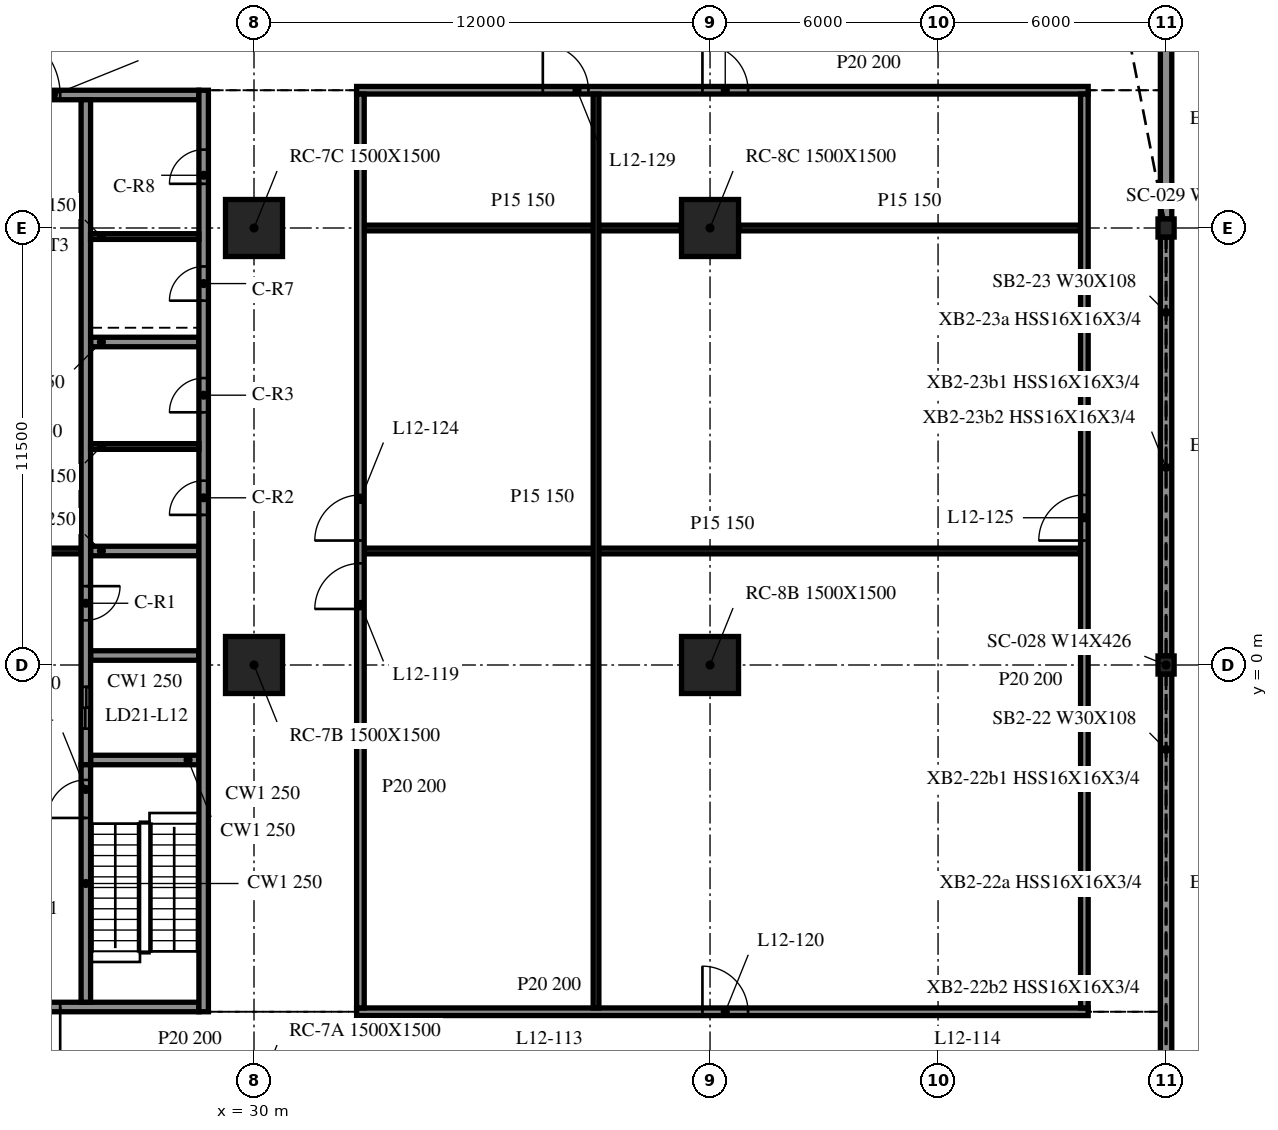
"""IFC4 building model, lengths in metres.
Left out: names, types, materials, properties, quantities, classifications, styles, units other than length and angle.
Written with IfcOpenShell. Run it as: python <this file> out.ifc"""

import sys

from ifc_helpers import new_model, si_unit, direction, frame, frame_2d, origin, origin_2d, place, context, subcontext, project, spatial, rectangle, i_section, extrude, element, fill, save


model = new_model("IFC4")
c1 = context("Model", 3, precision=1e-05, world=origin(), true_north=direction((0.0, 1.0)))
c2 = subcontext(c1, "Body", "Model", "MODEL_VIEW")
j1 = project(units=[si_unit("LENGTHUNIT", "METRE"), si_unit("PLANEANGLEUNIT", "RADIAN")], contexts=[c1])
p1 = place(None, origin())
s1 = spatial("IfcSite", under=j1, at=p1, CompositionType="ELEMENT")
p2 = place(p1, origin())
s2 = spatial("IfcBuilding", under=s1, at=p2, CompositionType="ELEMENT")
p3 = place(p2, frame((0.0, 0.0, 54.6)))
s3 = spatial("IfcBuildingStorey", under=s2, at=p3, CompositionType="ELEMENT", Elevation=54.6)
for number, where, z_axis, x_axis in (
    (1, (30.0, 0.0, -0.34), (0.0, 0.0, 1.0), (1.0, 0.0, 0.0)),
    (2, (30.0, 11.5, -0.34), (0.0, 0.0, 1.0), (1.0, 0.0, 0.0)),
    (3, (42.0, 0.0, -0.34), (0.0, 0.0, 1.0), (1.0, 0.0, 0.0)),
    (4, (42.0, 11.5, -0.34), (0.0, 0.0, 1.0), (1.0, 0.0, 0.0)),
):
    element("IfcColumn", number, at=place(p3, frame(where, z_axis=z_axis, x_axis=x_axis)), inside=s3, PredefinedType="COLUMN", context=c2, shape_type="SweptSolid", body=[
        extrude(rectangle(XDim=1.5, YDim=1.5, at=origin_2d()), origin(), (0.0, 0.0, 1.0), 4.3),
    ])
for number, where, z_axis, x_axis in (
    (5, (54.0, 0.0, -0.34), (0.0, 0.0, 1.0), (1.0, 0.0, 0.0)),
    (6, (54.0, 11.5, -0.34), (0.0, 0.0, 1.0), (1.0, 0.0, 0.0)),
):
    element("IfcColumn", number, at=place(p3, frame(where, z_axis=z_axis, x_axis=x_axis)), inside=s3, PredefinedType="COLUMN", context=c2, shape_type="SweptSolid", body=[
        extrude(i_section(OverallWidth=0.424, OverallDepth=0.475, WebThickness=0.048, FlangeThickness=0.077, at=origin_2d()), origin(), (0.0, 0.0, 1.0), 4.3),
    ])
for number, where, z_axis, x_axis in (
    (7, (54.0, -11.262, 0.0), (0.0, 0.0, 1.0), (0.0, 1.0, 0.0)),
    (8, (54.0, 0.238, 0.0), (0.0, 0.0, 1.0), (0.0, 1.0, 0.0)),
):
    element("IfcWall", number, at=place(p3, frame(where, z_axis=z_axis, x_axis=x_axis)), inside=s3, PredefinedType="NOTDEFINED", context=c2, shape_type="SweptSolid", body=[
        extrude(rectangle(XDim=11.024, YDim=0.3, at=frame_2d((5.512, 0.0))), origin(), (0.0, 0.0, 1.0), 3.203),
    ])
p4 = place(p3, frame((54.0, 11.738, 0.0), z_axis=(0.0, 0.0, 1.0), x_axis=(0.0, 1.0, 0.0)))
e9 = element("IfcWall", 9, at=p4, inside=s3, PredefinedType="NOTDEFINED", context=c2, shape_type="SweptSolid", body=[
    extrude(rectangle(XDim=5.262, YDim=0.3, at=frame_2d((2.631, 0.0))), origin(), (0.0, 0.0, 1.0), 3.203),
])
p5 = place(p3, frame((28.675, -9.125, 0.0), z_axis=(0.0, 0.0, 1.0), x_axis=(0.0, 1.0, 0.0)))
e10 = element("IfcWall", 10, at=p5, inside=s3, PredefinedType="SOLIDWALL", context=c2, shape_type="SweptSolid", body=[
    extrude(rectangle(XDim=24.25, YDim=0.25, at=frame_2d((12.125, 0.0))), origin(), (0.0, 0.0, 1.0), 3.96),
])
p6 = place(p5, frame((13.075, 0.0, 0.0)))
e11 = element("IfcOpeningElement", 11, at=p6, cuts=e10, PredefinedType="OPENING", context=c2, shape_type="SweptSolid", body=[
    extrude(rectangle(XDim=0.9, YDim=2.1, at=frame_2d((0.45, 1.05))), frame((0.0, 0.135, 0.0), z_axis=(0.0, -1.0, 0.0), x_axis=(1.0, 0.0, 0.0)), (0.0, 0.0, 1.0), 0.27),
])
p7 = place(p5, frame((15.775, 0.0, 0.0)))
e12 = element("IfcOpeningElement", 12, at=p7, cuts=e10, PredefinedType="OPENING", context=c2, shape_type="SweptSolid", body=[
    extrude(rectangle(XDim=0.9, YDim=2.1, at=frame_2d((0.45, 1.05))), frame((0.0, 0.135, 0.0), z_axis=(0.0, -1.0, 0.0), x_axis=(1.0, 0.0, 0.0)), (0.0, 0.0, 1.0), 0.27),
])
p8 = place(p5, frame((18.712, 0.0, 0.0)))
e13 = element("IfcOpeningElement", 13, at=p8, cuts=e10, PredefinedType="OPENING", context=c2, shape_type="SweptSolid", body=[
    extrude(rectangle(XDim=0.9, YDim=2.1, at=frame_2d((0.45, 1.05))), frame((0.0, 0.135, 0.0), z_axis=(0.0, -1.0, 0.0), x_axis=(1.0, 0.0, 0.0)), (0.0, 0.0, 1.0), 0.27),
])
p9 = place(p5, frame((21.788, 0.0, 0.0)))
e14 = element("IfcOpeningElement", 14, at=p9, cuts=e10, PredefinedType="OPENING", context=c2, shape_type="SweptSolid", body=[
    extrude(rectangle(XDim=0.9, YDim=2.1, at=frame_2d((0.45, 1.05))), frame((0.0, 0.135, 0.0), z_axis=(0.0, -1.0, 0.0), x_axis=(1.0, 0.0, 0.0)), (0.0, 0.0, 1.0), 0.27),
])
p10 = place(p3, frame((28.55, -9.0, 0.0), z_axis=(0.0, 0.0, 1.0), x_axis=(-1.0, 0.0, 0.0)))
e15 = element("IfcWall", 15, at=p10, inside=s3, PredefinedType="SOLIDWALL", context=c2, shape_type="SweptSolid", body=[
    extrude(rectangle(XDim=9.1, YDim=0.25, at=frame_2d((4.55, 0.0))), origin(), (0.0, 0.0, 1.0), 3.96),
])
p11 = place(p10, frame((3.65, 0.0, 0.0)))
e16 = element("IfcOpeningElement", 16, at=p11, cuts=e15, PredefinedType="OPENING", context=c2, shape_type="SweptSolid", body=[
    extrude(rectangle(XDim=1.8, YDim=2.1, at=frame_2d((0.9, 1.05))), frame((0.0, 0.135, 0.0), z_axis=(0.0, -1.0, 0.0), x_axis=(1.0, 0.0, 0.0)), (0.0, 0.0, 1.0), 0.27),
])
p12 = place(p3, frame((19.45, 15.0, 0.0), z_axis=(0.0, 0.0, 1.0), x_axis=(1.0, 0.0, 0.0)))
e17 = element("IfcWall", 17, at=p12, inside=s3, PredefinedType="SOLIDWALL", context=c2, shape_type="SweptSolid", body=[
    extrude(rectangle(XDim=9.1, YDim=0.25, at=frame_2d((4.55, 0.0))), origin(), (0.0, 0.0, 1.0), 3.96),
])
p13 = place(p12, frame((3.65, 0.0, 0.0)))
e18 = element("IfcOpeningElement", 18, at=p13, cuts=e17, PredefinedType="OPENING", context=c2, shape_type="SweptSolid", body=[
    extrude(rectangle(XDim=1.8, YDim=2.1, at=frame_2d((0.9, 1.05))), frame((0.0, 0.135, 0.0), z_axis=(0.0, -1.0, 0.0), x_axis=(1.0, 0.0, 0.0)), (0.0, 0.0, 1.0), 0.27),
])
p14 = place(p3, frame((25.575, -8.875, 0.0), z_axis=(0.0, 0.0, 1.0), x_axis=(0.0, 1.0, 0.0)))
e19 = element("IfcWall", 19, at=p14, inside=s3, PredefinedType="SOLIDWALL", context=c2, shape_type="SweptSolid", body=[
    extrude(rectangle(XDim=6.25, YDim=0.25, at=frame_2d((3.125, 0.0))), origin(), (0.0, 0.0, 1.0), 3.96),
])
p15 = place(p14, frame((4.85, 0.0, 0.0)))
e20 = element("IfcOpeningElement", 20, at=p15, cuts=e19, PredefinedType="OPENING", context=c2, shape_type="SweptSolid", body=[
    extrude(rectangle(XDim=1.0, YDim=2.1, at=frame_2d((0.5, 1.05))), frame((0.0, 0.135, 0.0), z_axis=(0.0, -1.0, 0.0), x_axis=(1.0, 0.0, 0.0)), (0.0, 0.0, 1.0), 0.27),
])
p16 = place(p3, frame((25.575, 14.875, 0.0), z_axis=(0.0, 0.0, 1.0), x_axis=(0.0, -1.0, 0.0)))
e21 = element("IfcWall", 21, at=p16, inside=s3, PredefinedType="SOLIDWALL", context=c2, shape_type="SweptSolid", body=[
    extrude(rectangle(XDim=17.5, YDim=0.25, at=frame_2d((8.75, 0.0))), origin(), (0.0, 0.0, 1.0), 3.96),
])
p17 = place(p16, frame((15.45, 0.0, 0.0)))
e22 = element("IfcOpeningElement", 22, at=p17, cuts=e21, PredefinedType="OPENING", context=c2, shape_type="SweptSolid", body=[
    extrude(rectangle(XDim=1.1, YDim=2.1, at=frame_2d((0.55, 1.05))), frame((0.0, 0.135, 0.0), z_axis=(0.0, -1.0, 0.0), x_axis=(1.0, 0.0, 0.0)), (0.0, 0.0, 1.0), 0.27),
])
p18 = place(p16, frame((12.8, 0.0, 0.0)))
e23 = element("IfcOpeningElement", 23, at=p18, cuts=e21, PredefinedType="OPENING", context=c2, shape_type="SweptSolid", body=[
    extrude(rectangle(XDim=0.9, YDim=2.1, at=frame_2d((0.45, 1.05))), frame((0.0, 0.135, 0.0), z_axis=(0.0, -1.0, 0.0), x_axis=(1.0, 0.0, 0.0)), (0.0, 0.0, 1.0), 0.27),
])
for number, where, z_axis, x_axis in (
    (24, (25.7, -2.5, 0.0), (0.0, 0.0, 1.0), (1.0, 0.0, 0.0)),
    (25, (25.7, 0.25, 0.0), (0.0, 0.0, 1.0), (1.0, 0.0, 0.0)),
    (26, (25.7, 3.0, 0.0), (0.0, 0.0, 1.0), (1.0, 0.0, 0.0)),
    (27, (25.7, 8.5, 0.0), (0.0, 0.0, 1.0), (1.0, 0.0, 0.0)),
):
    element("IfcWall", number, at=place(p3, frame(where, z_axis=z_axis, x_axis=x_axis)), inside=s3, PredefinedType="SOLIDWALL", context=c2, shape_type="SweptSolid", body=[
        extrude(rectangle(XDim=2.85, YDim=0.25, at=frame_2d((1.425, 0.0))), origin(), (0.0, 0.0, 1.0), 3.96),
    ])
p19 = place(p3, frame((22.55, 3.0, 0.0), z_axis=(0.0, 0.0, 1.0), x_axis=(1.0, 0.0, 0.0)))
e28 = element("IfcWall", 28, at=p19, inside=s3, PredefinedType="PARTITIONING", context=c2, shape_type="SweptSolid", body=[
    extrude(rectangle(XDim=2.9, YDim=0.15, at=frame_2d((1.45, 0.0))), origin(), (0.0, 0.0, 1.0), 3.96),
])
for number, where, z_axis, x_axis in (
    (29, (25.7, 5.75, 0.0), (0.0, 0.0, 1.0), (1.0, 0.0, 0.0)),
    (30, (25.7, 11.275, 0.0), (0.0, 0.0, 1.0), (1.0, 0.0, 0.0)),
):
    element("IfcWall", number, at=place(p3, frame(where, z_axis=z_axis, x_axis=x_axis)), inside=s3, PredefinedType="PARTITIONING", context=c2, shape_type="SweptSolid", body=[
        extrude(rectangle(XDim=2.85, YDim=0.15, at=frame_2d((1.425, 0.0))), origin(), (0.0, 0.0, 1.0), 3.96),
    ])
p20 = place(p3, frame((32.7, -9.125, 0.0), z_axis=(0.0, 0.0, 1.0), x_axis=(1.0, 0.0, 0.0)))
e31 = element("IfcWall", 31, at=p20, inside=s3, PredefinedType="PARTITIONING", context=c2, shape_type="SweptSolid", body=[
    extrude(rectangle(XDim=19.25, YDim=0.2, at=frame_2d((9.625, 0.0))), origin(), (0.0, 0.0, 1.0), 3.96),
])
p21 = place(p20, frame((9.1, 0.0, 0.0)))
e32 = element("IfcOpeningElement", 32, at=p21, cuts=e31, PredefinedType="OPENING", context=c2, shape_type="SweptSolid", body=[
    extrude(rectangle(XDim=1.2, YDim=2.1, at=frame_2d((0.6, 1.05))), frame((0.0, 0.11, 0.0), z_axis=(0.0, -1.0, 0.0), x_axis=(1.0, 0.0, 0.0)), (0.0, 0.0, 1.0), 0.22),
])
p22 = place(p3, frame((32.9, 3.0, 0.0), z_axis=(0.0, 0.0, 1.0), x_axis=(1.0, 0.0, 0.0)))
e33 = element("IfcWall", 33, at=p22, inside=s3, PredefinedType="PARTITIONING", context=c2, shape_type="SweptSolid", body=[
    extrude(rectangle(XDim=18.85, YDim=0.15, at=frame_2d((9.425, 0.0))), origin(), (0.0, 0.0, 1.0), 3.96),
])
p23 = place(p3, frame((32.9, 11.5, 0.0), z_axis=(0.0, 0.0, 1.0), x_axis=(1.0, 0.0, 0.0)))
e34 = element("IfcWall", 34, at=p23, inside=s3, PredefinedType="PARTITIONING", context=c2, shape_type="SweptSolid", body=[
    extrude(rectangle(XDim=8.35, YDim=0.15, at=frame_2d((4.175, 0.0))), origin(), (0.0, 0.0, 1.0), 3.96),
])
p24 = place(p3, frame((42.75, 11.5, 0.0), z_axis=(0.0, 0.0, 1.0), x_axis=(1.0, 0.0, 0.0)))
e35 = element("IfcWall", 35, at=p24, inside=s3, PredefinedType="PARTITIONING", context=c2, shape_type="SweptSolid", body=[
    extrude(rectangle(XDim=9.0, YDim=0.15, at=frame_2d((4.5, 0.0))), origin(), (0.0, 0.0, 1.0), 3.96),
])
p25 = place(p3, frame((32.7, 15.125, 0.0), z_axis=(0.0, 0.0, 1.0), x_axis=(1.0, 0.0, 0.0)))
e36 = element("IfcWall", 36, at=p25, inside=s3, PredefinedType="PARTITIONING", context=c2, shape_type="SweptSolid", body=[
    extrude(rectangle(XDim=19.25, YDim=0.2, at=frame_2d((9.625, 0.0))), origin(), (0.0, 0.0, 1.0), 3.96),
])
p26 = place(p25, frame((4.9, 0.0, 0.0)))
e37 = element("IfcOpeningElement", 37, at=p26, cuts=e36, PredefinedType="OPENING", context=c2, shape_type="SweptSolid", body=[
    extrude(rectangle(XDim=1.2, YDim=2.1, at=frame_2d((0.6, 1.05))), frame((0.0, 0.11, 0.0), z_axis=(0.0, -1.0, 0.0), x_axis=(1.0, 0.0, 0.0)), (0.0, 0.0, 1.0), 0.22),
])
p27 = place(p25, frame((9.1, 0.0, 0.0)))
e38 = element("IfcOpeningElement", 38, at=p27, cuts=e36, PredefinedType="OPENING", context=c2, shape_type="SweptSolid", body=[
    extrude(rectangle(XDim=1.2, YDim=2.1, at=frame_2d((0.6, 1.05))), frame((0.0, 0.11, 0.0), z_axis=(0.0, -1.0, 0.0), x_axis=(1.0, 0.0, 0.0)), (0.0, 0.0, 1.0), 0.22),
])
p28 = place(p3, frame((32.8, -9.025, 0.0), z_axis=(0.0, 0.0, 1.0), x_axis=(0.0, 1.0, 0.0)))
e39 = element("IfcWall", 39, at=p28, inside=s3, PredefinedType="PARTITIONING", context=c2, shape_type="SweptSolid", body=[
    extrude(rectangle(XDim=24.05, YDim=0.2, at=frame_2d((12.025, 0.0))), origin(), (0.0, 0.0, 1.0), 3.96),
])
p29 = place(p28, frame((10.5, 0.0, 0.0)))
e40 = element("IfcOpeningElement", 40, at=p29, cuts=e39, PredefinedType="OPENING", context=c2, shape_type="SweptSolid", body=[
    extrude(rectangle(XDim=1.2, YDim=2.1, at=frame_2d((0.6, 1.05))), frame((0.0, 0.11, 0.0), z_axis=(0.0, -1.0, 0.0), x_axis=(1.0, 0.0, 0.0)), (0.0, 0.0, 1.0), 0.22),
])
p30 = place(p28, frame((12.3, 0.0, 0.0)))
e41 = element("IfcOpeningElement", 41, at=p30, cuts=e39, PredefinedType="OPENING", context=c2, shape_type="SweptSolid", body=[
    extrude(rectangle(XDim=1.2, YDim=2.1, at=frame_2d((0.6, 1.05))), frame((0.0, 0.11, 0.0), z_axis=(0.0, -1.0, 0.0), x_axis=(1.0, 0.0, 0.0)), (0.0, 0.0, 1.0), 0.22),
])
p31 = place(p3, frame((39.0, -9.025, 0.0), z_axis=(0.0, 0.0, 1.0), x_axis=(0.0, 1.0, 0.0)))
e42 = element("IfcWall", 42, at=p31, inside=s3, PredefinedType="PARTITIONING", context=c2, shape_type="SweptSolid", body=[
    extrude(rectangle(XDim=24.05, YDim=0.15, at=frame_2d((12.025, 0.0))), origin(), (0.0, 0.0, 1.0), 3.96),
])
p32 = place(p3, frame((51.85, -9.025, 0.0), z_axis=(0.0, 0.0, 1.0), x_axis=(0.0, 1.0, 0.0)))
e43 = element("IfcWall", 43, at=p32, inside=s3, PredefinedType="PARTITIONING", context=c2, shape_type="SweptSolid", body=[
    extrude(rectangle(XDim=24.05, YDim=0.2, at=frame_2d((12.025, 0.0))), origin(), (0.0, 0.0, 1.0), 3.96),
])
p33 = place(p32, frame((12.3, 0.0, 0.0)))
e44 = element("IfcOpeningElement", 44, at=p33, cuts=e43, PredefinedType="OPENING", context=c2, shape_type="SweptSolid", body=[
    extrude(rectangle(XDim=1.2, YDim=2.1, at=frame_2d((0.6, 1.05))), frame((0.0, 0.11, 0.0), z_axis=(0.0, -1.0, 0.0), x_axis=(1.0, 0.0, 0.0)), (0.0, 0.0, 1.0), 0.22),
])
p34 = place(p11, origin())
e45 = element("IfcDoor", 45, at=p34, inside=s3, OperationType="DOUBLE_DOOR_SINGLE_SWING", PredefinedType="DOOR", context=c2, shape_type="SweptSolid", body=[
    extrude(rectangle(XDim=1.8, YDim=2.1, at=frame_2d((0.9, 1.05))), frame((0.0, 0.025, 0.0), z_axis=(0.0, -1.0, 0.0), x_axis=(1.0, 0.0, 0.0)), (0.0, 0.0, 1.0), 0.05),
])
fill(e16, e45)
p35 = place(p13, origin())
e46 = element("IfcDoor", 46, at=p35, inside=s3, OperationType="DOUBLE_DOOR_SINGLE_SWING", PredefinedType="DOOR", context=c2, shape_type="SweptSolid", body=[
    extrude(rectangle(XDim=1.8, YDim=2.1, at=frame_2d((0.9, 1.05))), frame((0.0, 0.025, 0.0), z_axis=(0.0, -1.0, 0.0), x_axis=(1.0, 0.0, 0.0)), (0.0, 0.0, 1.0), 0.05),
])
fill(e18, e46)
p36 = place(p17, origin())
e47 = element("IfcDoor", 47, at=p36, inside=s3, OperationType="DOUBLE_DOOR_SLIDING", PredefinedType="DOOR", context=c2, shape_type="SweptSolid", body=[
    extrude(rectangle(XDim=1.1, YDim=2.1, at=frame_2d((0.55, 1.05))), frame((0.0, 0.025, 0.0), z_axis=(0.0, -1.0, 0.0), x_axis=(1.0, 0.0, 0.0)), (0.0, 0.0, 1.0), 0.05),
])
fill(e22, e47)
p37 = place(p18, origin())
e48 = element("IfcDoor", 48, at=p37, inside=s3, OperationType="SINGLE_SWING_LEFT", PredefinedType="DOOR", context=c2, shape_type="SweptSolid", body=[
    extrude(rectangle(XDim=0.9, YDim=2.1, at=frame_2d((0.45, 1.05))), frame((0.0, 0.025, 0.0), z_axis=(0.0, -1.0, 0.0), x_axis=(1.0, 0.0, 0.0)), (0.0, 0.0, 1.0), 0.05),
])
fill(e23, e48)
p38 = place(p6, origin())
e49 = element("IfcDoor", 49, at=p38, inside=s3, OperationType="SINGLE_SWING_RIGHT", PredefinedType="DOOR", context=c2, shape_type="SweptSolid", body=[
    extrude(rectangle(XDim=0.9, YDim=2.1, at=frame_2d((0.45, 1.05))), frame((0.0, 0.025, 0.0), z_axis=(0.0, -1.0, 0.0), x_axis=(1.0, 0.0, 0.0)), (0.0, 0.0, 1.0), 0.05),
])
fill(e11, e49)
p39 = place(p7, origin())
e50 = element("IfcDoor", 50, at=p39, inside=s3, OperationType="SINGLE_SWING_LEFT", PredefinedType="DOOR", context=c2, shape_type="SweptSolid", body=[
    extrude(rectangle(XDim=0.9, YDim=2.1, at=frame_2d((0.45, 1.05))), frame((0.0, 0.025, 0.0), z_axis=(0.0, -1.0, 0.0), x_axis=(1.0, 0.0, 0.0)), (0.0, 0.0, 1.0), 0.05),
])
fill(e12, e50)
p40 = place(p8, origin())
e51 = element("IfcDoor", 51, at=p40, inside=s3, OperationType="SINGLE_SWING_LEFT", PredefinedType="DOOR", context=c2, shape_type="SweptSolid", body=[
    extrude(rectangle(XDim=0.9, YDim=2.1, at=frame_2d((0.45, 1.05))), frame((0.0, 0.025, 0.0), z_axis=(0.0, -1.0, 0.0), x_axis=(1.0, 0.0, 0.0)), (0.0, 0.0, 1.0), 0.05),
])
fill(e13, e51)
p41 = place(p9, origin())
e52 = element("IfcDoor", 52, at=p41, inside=s3, OperationType="SINGLE_SWING_RIGHT", PredefinedType="DOOR", context=c2, shape_type="SweptSolid", body=[
    extrude(rectangle(XDim=0.9, YDim=2.1, at=frame_2d((0.45, 1.05))), frame((0.0, 0.025, 0.0), z_axis=(0.0, -1.0, 0.0), x_axis=(1.0, 0.0, 0.0)), (0.0, 0.0, 1.0), 0.05),
])
fill(e14, e52)
p42 = place(p15, origin())
e53 = element("IfcDoor", 53, at=p42, inside=s3, OperationType="SINGLE_SWING_RIGHT", PredefinedType="DOOR", context=c2, shape_type="SweptSolid", body=[
    extrude(rectangle(XDim=1.0, YDim=2.1, at=frame_2d((0.5, 1.05))), frame((0.0, 0.025, 0.0), z_axis=(0.0, -1.0, 0.0), x_axis=(1.0, 0.0, 0.0)), (0.0, 0.0, 1.0), 0.05),
])
fill(e20, e53)
p43 = place(p29, origin())
e54 = element("IfcDoor", 54, at=p43, inside=s3, OperationType="SINGLE_SWING_RIGHT", PredefinedType="DOOR", context=c2, shape_type="SweptSolid", body=[
    extrude(rectangle(XDim=1.2, YDim=2.1, at=frame_2d((0.6, 1.05))), frame((0.0, 0.025, 0.0), z_axis=(0.0, -1.0, 0.0), x_axis=(1.0, 0.0, 0.0)), (0.0, 0.0, 1.0), 0.05),
])
fill(e40, e54)
p44 = place(p21, origin())
e55 = element("IfcDoor", 55, at=p44, inside=s3, OperationType="SINGLE_SWING_RIGHT", PredefinedType="DOOR", context=c2, shape_type="SweptSolid", body=[
    extrude(rectangle(XDim=1.2, YDim=2.1, at=frame_2d((0.6, 1.05))), frame((0.0, 0.025, 0.0), z_axis=(0.0, -1.0, 0.0), x_axis=(1.0, 0.0, 0.0)), (0.0, 0.0, 1.0), 0.05),
])
fill(e32, e55)
p45 = place(p30, origin())
e56 = element("IfcDoor", 56, at=p45, inside=s3, OperationType="SINGLE_SWING_LEFT", PredefinedType="DOOR", context=c2, shape_type="SweptSolid", body=[
    extrude(rectangle(XDim=1.2, YDim=2.1, at=frame_2d((0.6, 1.05))), frame((0.0, 0.025, 0.0), z_axis=(0.0, -1.0, 0.0), x_axis=(1.0, 0.0, 0.0)), (0.0, 0.0, 1.0), 0.05),
])
fill(e41, e56)
p46 = place(p33, origin())
e57 = element("IfcDoor", 57, at=p46, inside=s3, OperationType="SINGLE_SWING_RIGHT", PredefinedType="DOOR", context=c2, shape_type="SweptSolid", body=[
    extrude(rectangle(XDim=1.2, YDim=2.1, at=frame_2d((0.6, 1.05))), frame((0.0, 0.025, 0.0), z_axis=(0.0, -1.0, 0.0), x_axis=(1.0, 0.0, 0.0)), (0.0, 0.0, 1.0), 0.05),
])
fill(e44, e57)
p47 = place(p26, origin())
e58 = element("IfcDoor", 58, at=p47, inside=s3, OperationType="SINGLE_SWING_RIGHT", PredefinedType="DOOR", context=c2, shape_type="SweptSolid", body=[
    extrude(rectangle(XDim=1.2, YDim=2.1, at=frame_2d((0.6, 1.05))), frame((0.0, 0.025, 0.0), z_axis=(0.0, -1.0, 0.0), x_axis=(1.0, 0.0, 0.0)), (0.0, 0.0, 1.0), 0.05),
])
fill(e37, e58)
p48 = place(p27, origin())
e59 = element("IfcDoor", 59, at=p48, inside=s3, OperationType="SINGLE_SWING_LEFT", PredefinedType="DOOR", context=c2, shape_type="SweptSolid", body=[
    extrude(rectangle(XDim=1.2, YDim=2.1, at=frame_2d((0.6, 1.05))), frame((0.0, 0.025, 0.0), z_axis=(0.0, -1.0, 0.0), x_axis=(1.0, 0.0, 0.0)), (0.0, 0.0, 1.0), 0.05),
])
fill(e38, e59)
save(model, sys.argv[1])
